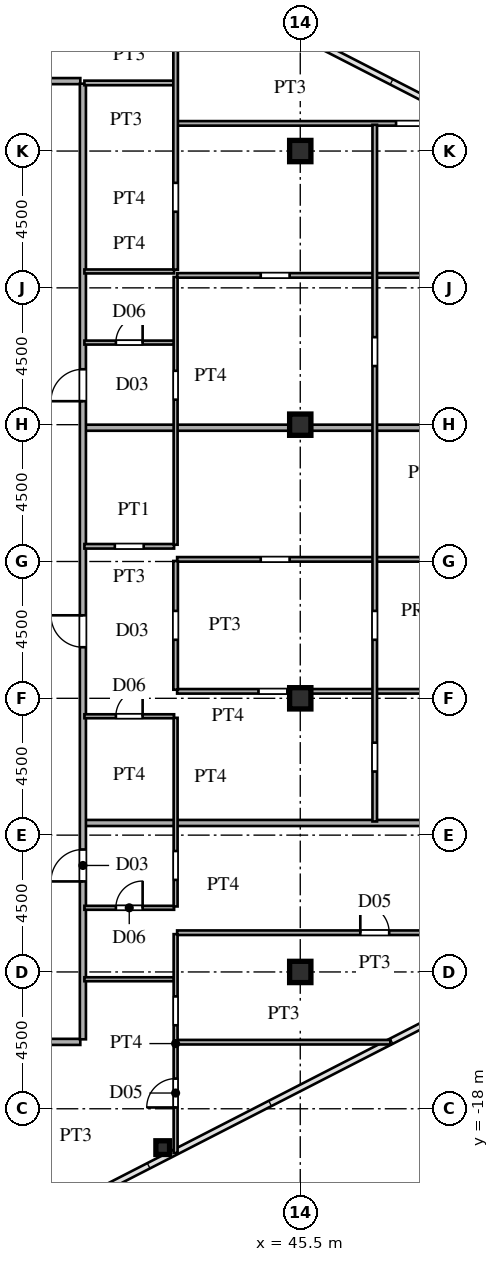
"""IFC4 building model, lengths in metres.
Left out: names, types, materials, properties, quantities, classifications, styles, units other than length and angle.
Written with IfcOpenShell. Run it as: python <this file> out.ifc"""

import sys

from ifc_helpers import new_model, si_unit, direction, frame, frame_2d, origin, origin_2d, place, context, subcontext, project, spatial, rectangle, hollow_rectangle, i_section, extrude, source, transform, mapped, element, fill, save


model = new_model("IFC4")
c1 = context("Model", 3, precision=1e-05, world=origin(), true_north=direction((0.0, 1.0)))
c2 = subcontext(c1, "Body", "Model", "MODEL_VIEW")
j1 = project(units=[si_unit("LENGTHUNIT", "METRE"), si_unit("PLANEANGLEUNIT", "RADIAN")], contexts=[c1])
p1 = place(None, origin())
s1 = spatial("IfcSite", under=j1, at=p1, CompositionType="ELEMENT")
p2 = place(p1, origin())
s2 = spatial("IfcBuilding", under=s1, at=p2, CompositionType="ELEMENT")
p3 = place(p2, frame((0.0, 0.0, 154.8)))
s3 = spatial("IfcBuildingStorey", under=s2, at=p3, CompositionType="ELEMENT", Elevation=154.8)
m1 = source(origin(), c2, "Body", "SweptSolid", [
    extrude(i_section(OverallWidth=0.7, OverallDepth=0.7, WebThickness=0.028, FlangeThickness=0.045, at=origin_2d()), origin(), (0.0, 0.0, 1.0), 3.6),
])
for number, where, z_axis, x_axis in (
    (1, (45.5, -13.5, 0.0), (0.0, 0.0, 1.0), (1.0, 0.0, 0.0)),
    (2, (45.5, -4.5, 0.0), (0.0, 0.0, 1.0), (1.0, 0.0, 0.0)),
    (3, (45.5, 4.5, 0.0), (0.0, 0.0, 1.0), (1.0, 0.0, 0.0)),
    (4, (45.5, 13.5, 0.0), (0.0, 0.0, 1.0), (1.0, 0.0, 0.0)),
):
    element("IfcColumn", number, at=place(p3, frame(where, z_axis=z_axis, x_axis=x_axis)), inside=s3, PredefinedType="COLUMN", context=c2, shape_type="MappedRepresentation", body=[
        mapped(m1, transform((0.0, 0.0, 0.0), scale=1.0)),
    ])
m2 = source(origin(), c2, "Body", "SweptSolid", [
    extrude(hollow_rectangle(XDim=0.45, YDim=0.45, WallThickness=0.018, at=origin_2d()), origin(), (0.0, 0.0, 1.0), 3.6),
])
p4 = place(p3, frame((40.976, -19.278, 0.0), z_axis=(0.0, 0.0, 1.0), x_axis=(1.0, 0.0, 0.0)))
e5 = element("IfcColumn", 5, at=p4, inside=s3, PredefinedType="COLUMN", context=c2, shape_type="MappedRepresentation", body=[
    mapped(m2, transform((0.0, 0.0, 0.0), scale=1.0)),
])
p5 = place(p3, frame((41.45, -15.81, 0.0), z_axis=(0.0, 0.0, 1.0), x_axis=(1.0, 0.0, 0.0)))
e6 = element("IfcWall", 6, at=p5, inside=s3, PredefinedType="PARTITIONING", context=c2, shape_type="SweptSolid", body=[
    extrude(rectangle(XDim=7.013, YDim=0.15, at=frame_2d((3.506, 0.0))), origin(), (0.0, 0.0, 1.0), 3.38),
])
p6 = place(p3, frame((27.5, -15.8, 0.0), z_axis=(0.0, 0.0, 1.0), x_axis=(1.0, 0.0, 0.0)))
e7 = element("IfcWall", 7, at=p6, inside=s3, PredefinedType="PARTITIONING", context=c2, shape_type="SweptSolid", body=[
    extrude(rectangle(XDim=10.765, YDim=0.2, at=frame_2d((5.382, 0.0))), origin(), (0.0, 0.0, 1.0), 3.38),
])
p7 = place(p3, frame((38.4, -13.74, 0.0), z_axis=(0.0, 0.0, 1.0), x_axis=(1.0, 0.0, 0.0)))
e8 = element("IfcWall", 8, at=p7, inside=s3, PredefinedType="PARTITIONING", context=c2, shape_type="SweptSolid", body=[
    extrude(rectangle(XDim=2.95, YDim=0.13, at=frame_2d((1.475, 0.0))), origin(), (0.0, 0.0, 1.0), 3.38),
])
p8 = place(p3, frame((41.45, -12.21, 0.0), z_axis=(0.0, 0.0, 1.0), x_axis=(1.0, 0.0, 0.0)))
e9 = element("IfcWall", 9, at=p8, inside=s3, PredefinedType="PARTITIONING", context=c2, shape_type="SweptSolid", body=[
    extrude(rectangle(XDim=13.0, YDim=0.15, at=frame_2d((6.5, 0.0))), origin(), (0.0, 0.0, 1.0), 3.38),
])
p9 = place(p8, frame((6.025, 0.0, 0.0)))
e10 = element("IfcOpeningElement", 10, at=p9, cuts=e9, PredefinedType="OPENING", context=c2, shape_type="SweptSolid", body=[
    extrude(rectangle(XDim=0.95, YDim=2.15, at=frame_2d((0.475, 1.075))), frame((0.0, 0.085, 0.0), z_axis=(0.0, -1.0, 0.0), x_axis=(1.0, 0.0, 0.0)), (0.0, 0.0, 1.0), 0.17),
])
p10 = place(p3, frame((38.4, -11.39, 0.0), z_axis=(0.0, 0.0, 1.0), x_axis=(1.0, 0.0, 0.0)))
e11 = element("IfcWall", 11, at=p10, inside=s3, PredefinedType="PARTITIONING", context=c2, shape_type="SweptSolid", body=[
    extrude(rectangle(XDim=2.95, YDim=0.13, at=frame_2d((1.475, 0.0))), origin(), (0.0, 0.0, 1.0), 3.38),
])
p11 = place(p10, frame((1.035, 0.0, 0.0)))
e12 = element("IfcOpeningElement", 12, at=p11, cuts=e11, PredefinedType="OPENING", context=c2, shape_type="SweptSolid", body=[
    extrude(rectangle(XDim=0.88, YDim=2.1, at=frame_2d((0.44, 1.05))), frame((0.0, 0.075, 0.0), z_axis=(0.0, -1.0, 0.0), x_axis=(1.0, 0.0, 0.0)), (0.0, 0.0, 1.0), 0.15),
])
p12 = place(p3, frame((38.43, -8.6, 0.0), z_axis=(0.0, 0.0, 1.0), x_axis=(1.0, 0.0, 0.0)))
e13 = element("IfcWall", 13, at=p12, inside=s3, PredefinedType="PARTITIONING", context=c2, shape_type="SweptSolid", body=[
    extrude(rectangle(XDim=24.066, YDim=0.2, at=frame_2d((12.033, 0.0))), origin(), (0.0, 0.0, 1.0), 3.38),
])
p13 = place(p3, frame((38.4, -5.09, 0.0), z_axis=(0.0, 0.0, 1.0), x_axis=(1.0, 0.0, 0.0)))
e14 = element("IfcWall", 14, at=p13, inside=s3, PredefinedType="PARTITIONING", context=c2, shape_type="SweptSolid", body=[
    extrude(rectangle(XDim=2.95, YDim=0.13, at=frame_2d((1.475, 0.0))), origin(), (0.0, 0.0, 1.0), 3.38),
])
p14 = place(p13, frame((1.035, 0.0, 0.0)))
e15 = element("IfcOpeningElement", 15, at=p14, cuts=e14, PredefinedType="OPENING", context=c2, shape_type="SweptSolid", body=[
    extrude(rectangle(XDim=0.88, YDim=2.1, at=frame_2d((0.44, 1.05))), frame((0.0, 0.075, 0.0), z_axis=(0.0, -1.0, 0.0), x_axis=(1.0, 0.0, 0.0)), (0.0, 0.0, 1.0), 0.15),
])
p15 = place(p3, frame((41.45, -4.27, 0.0), z_axis=(0.0, 0.0, 1.0), x_axis=(1.0, 0.0, 0.0)))
e16 = element("IfcWall", 16, at=p15, inside=s3, PredefinedType="PARTITIONING", context=c2, shape_type="SweptSolid", body=[
    extrude(rectangle(XDim=27.925, YDim=0.15, at=frame_2d((13.962, 0.0))), origin(), (0.0, 0.0, 1.0), 3.38),
])
p16 = place(p15, frame((2.676, 0.0, 0.0)))
e17 = element("IfcOpeningElement", 17, at=p16, cuts=e16, PredefinedType="OPENING", context=c2, shape_type="SweptSolid", body=[
    extrude(rectangle(XDim=0.95, YDim=2.15, at=frame_2d((0.475, 1.075))), frame((0.0, 0.085, 0.0), z_axis=(0.0, -1.0, 0.0), x_axis=(1.0, 0.0, 0.0)), (0.0, 0.0, 1.0), 0.17),
])
p17 = place(p15, frame((15.425, 0.0, 0.0)))
e18 = element("IfcOpeningElement", 18, at=p17, cuts=e16, PredefinedType="OPENING", context=c2, shape_type="SweptSolid", body=[
    extrude(rectangle(XDim=0.95, YDim=2.15, at=frame_2d((0.475, 1.075))), frame((0.0, 0.085, 0.0), z_axis=(0.0, -1.0, 0.0), x_axis=(1.0, 0.0, 0.0)), (0.0, 0.0, 1.0), 0.17),
])
p18 = place(p3, frame((41.45, 0.07, 0.0), z_axis=(0.0, 0.0, 1.0), x_axis=(1.0, 0.0, 0.0)))
e19 = element("IfcWall", 19, at=p18, inside=s3, PredefinedType="PARTITIONING", context=c2, shape_type="SweptSolid", body=[
    extrude(rectangle(XDim=28.085, YDim=0.15, at=frame_2d((14.042, 0.0))), origin(), (0.0, 0.0, 1.0), 3.38),
])
p19 = place(p18, frame((2.75, 0.0, 0.0)))
e20 = element("IfcOpeningElement", 20, at=p19, cuts=e19, PredefinedType="OPENING", context=c2, shape_type="SweptSolid", body=[
    extrude(rectangle(XDim=0.95, YDim=2.15, at=frame_2d((0.475, 1.075))), frame((0.0, 0.085, 0.0), z_axis=(0.0, -1.0, 0.0), x_axis=(1.0, 0.0, 0.0)), (0.0, 0.0, 1.0), 0.17),
])
p20 = place(p18, frame((15.425, 0.0, 0.0)))
e21 = element("IfcOpeningElement", 21, at=p20, cuts=e19, PredefinedType="OPENING", context=c2, shape_type="SweptSolid", body=[
    extrude(rectangle(XDim=0.95, YDim=2.15, at=frame_2d((0.475, 1.075))), frame((0.0, 0.085, 0.0), z_axis=(0.0, -1.0, 0.0), x_axis=(1.0, 0.0, 0.0)), (0.0, 0.0, 1.0), 0.17),
])
p21 = place(p3, frame((38.4, 0.5, 0.0), z_axis=(0.0, 0.0, 1.0), x_axis=(1.0, 0.0, 0.0)))
e22 = element("IfcWall", 22, at=p21, inside=s3, PredefinedType="PARTITIONING", context=c2, shape_type="SweptSolid", body=[
    extrude(rectangle(XDim=2.95, YDim=0.15, at=frame_2d((1.475, 0.0))), origin(), (0.0, 0.0, 1.0), 3.38),
])
p22 = place(p21, frame((1.0, 0.0, 0.0)))
e23 = element("IfcOpeningElement", 23, at=p22, cuts=e22, PredefinedType="OPENING", context=c2, shape_type="SweptSolid", body=[
    extrude(rectangle(XDim=0.95, YDim=2.15, at=frame_2d((0.475, 1.075))), frame((0.0, 0.085, 0.0), z_axis=(0.0, -1.0, 0.0), x_axis=(1.0, 0.0, 0.0)), (0.0, 0.0, 1.0), 0.17),
])
p23 = place(p3, frame((38.43, 4.4, 0.0), z_axis=(0.0, 0.0, 1.0), x_axis=(1.0, 0.0, 0.0)))
e24 = element("IfcWall", 24, at=p23, inside=s3, PredefinedType="PARTITIONING", context=c2, shape_type="SweptSolid", body=[
    extrude(rectangle(XDim=16.09, YDim=0.2, at=frame_2d((8.045, 0.0))), origin(), (0.0, 0.0, 1.0), 2.78),
])
p24 = place(p3, frame((38.4, 7.2, 0.0), z_axis=(0.0, 0.0, 1.0), x_axis=(1.0, 0.0, 0.0)))
e25 = element("IfcWall", 25, at=p24, inside=s3, PredefinedType="PARTITIONING", context=c2, shape_type="SweptSolid", body=[
    extrude(rectangle(XDim=2.95, YDim=0.13, at=frame_2d((1.475, 0.0))), origin(), (0.0, 0.0, 1.0), 3.38),
])
p25 = place(p24, frame((1.035, 0.0, 0.0)))
e26 = element("IfcOpeningElement", 26, at=p25, cuts=e25, PredefinedType="OPENING", context=c2, shape_type="SweptSolid", body=[
    extrude(rectangle(XDim=0.88, YDim=2.1, at=frame_2d((0.44, 1.05))), frame((0.0, 0.075, 0.0), z_axis=(0.0, -1.0, 0.0), x_axis=(1.0, 0.0, 0.0)), (0.0, 0.0, 1.0), 0.15),
])
p26 = place(p3, frame((41.45, 9.41, 0.0), z_axis=(0.0, 0.0, 1.0), x_axis=(1.0, 0.0, 0.0)))
e27 = element("IfcWall", 27, at=p26, inside=s3, PredefinedType="PARTITIONING", context=c2, shape_type="SweptSolid", body=[
    extrude(rectangle(XDim=18.7, YDim=0.15, at=frame_2d((9.35, 0.0))), origin(), (0.0, 0.0, 1.0), 3.38),
])
p27 = place(p26, frame((2.75, 0.0, 0.0)))
e28 = element("IfcOpeningElement", 28, at=p27, cuts=e27, PredefinedType="OPENING", context=c2, shape_type="SweptSolid", body=[
    extrude(rectangle(XDim=0.95, YDim=2.15, at=frame_2d((0.475, 1.075))), frame((0.0, 0.085, 0.0), z_axis=(0.0, -1.0, 0.0), x_axis=(1.0, 0.0, 0.0)), (0.0, 0.0, 1.0), 0.17),
])
p28 = place(p26, frame((15.425, 0.0, 0.0)))
e29 = element("IfcOpeningElement", 29, at=p28, cuts=e27, PredefinedType="OPENING", context=c2, shape_type="SweptSolid", body=[
    extrude(rectangle(XDim=0.95, YDim=2.15, at=frame_2d((0.475, 1.075))), frame((0.0, 0.085, 0.0), z_axis=(0.0, -1.0, 0.0), x_axis=(1.0, 0.0, 0.0)), (0.0, 0.0, 1.0), 0.17),
])
p29 = place(p26, frame((9.3, 0.0, 0.0)))
e30 = element("IfcOpeningElement", 30, at=p29, cuts=e27, PredefinedType="OPENING", context=c2, shape_type="SweptSolid", body=[
    extrude(rectangle(XDim=0.95, YDim=2.15, at=frame_2d((0.475, 1.075))), frame((0.0, 0.085, 0.0), z_axis=(0.0, -1.0, 0.0), x_axis=(1.0, 0.0, 0.0)), (0.0, 0.0, 1.0), 0.17),
])
p30 = place(p3, frame((38.4, 9.54, 0.0), z_axis=(0.0, 0.0, 1.0), x_axis=(1.0, 0.0, 0.0)))
e31 = element("IfcWall", 31, at=p30, inside=s3, PredefinedType="PARTITIONING", context=c2, shape_type="SweptSolid", body=[
    extrude(rectangle(XDim=2.95, YDim=0.13, at=frame_2d((1.475, 0.0))), origin(), (0.0, 0.0, 1.0), 3.38),
])
p31 = place(p3, frame((41.45, 14.41, 0.0), z_axis=(0.0, 0.0, 1.0), x_axis=(1.0, 0.0, 0.0)))
e32 = element("IfcWall", 32, at=p31, inside=s3, PredefinedType="PARTITIONING", context=c2, shape_type="SweptSolid", body=[
    extrude(rectangle(XDim=9.741, YDim=0.15, at=frame_2d((4.871, 0.0))), origin(), (0.0, 0.0, 1.0), 3.38),
])
p32 = place(p31, frame((7.201, 0.0, 0.0)))
e33 = element("IfcOpeningElement", 33, at=p32, cuts=e32, PredefinedType="OPENING", context=c2, shape_type="SweptSolid", body=[
    extrude(rectangle(XDim=0.95, YDim=2.15, at=frame_2d((0.475, 1.075))), frame((0.0, 0.085, 0.0), z_axis=(0.0, -1.0, 0.0), x_axis=(1.0, 0.0, 0.0)), (0.0, 0.0, 1.0), 0.17),
])
p33 = place(p3, frame((38.4, 15.74, 0.0), z_axis=(0.0, 0.0, 1.0), x_axis=(1.0, 0.0, 0.0)))
e34 = element("IfcWall", 34, at=p33, inside=s3, PredefinedType="PARTITIONING", context=c2, shape_type="SweptSolid", body=[
    extrude(rectangle(XDim=2.95, YDim=0.15, at=frame_2d((1.475, 0.0))), origin(), (0.0, 0.0, 1.0), 3.38),
])
p34 = place(p3, frame((27.5, 15.8, 0.0), z_axis=(0.0, 0.0, 1.0), x_axis=(1.0, 0.0, 0.0)))
e35 = element("IfcWall", 35, at=p34, inside=s3, PredefinedType="PARTITIONING", context=c2, shape_type="SweptSolid", body=[
    extrude(rectangle(XDim=10.765, YDim=0.2, at=frame_2d((5.382, 0.0))), origin(), (0.0, 0.0, 1.0), 3.38),
])
p35 = place(p3, frame((38.35, -15.715, 0.0), z_axis=(0.0, 0.0, 1.0), x_axis=(0.0, 1.0, 0.0)))
e36 = element("IfcWall", 36, at=p35, inside=s3, PredefinedType="PARTITIONING", context=c2, shape_type="SweptSolid", body=[
    extrude(rectangle(XDim=31.43, YDim=0.2, at=frame_2d((15.715, 0.0))), origin(), (0.0, 0.0, 1.0), 3.38),
])
p36 = place(p35, frame((5.192, 0.0, 0.0)))
e37 = element("IfcOpeningElement", 37, at=p36, cuts=e36, PredefinedType="OPENING", context=c2, shape_type="SweptSolid", body=[
    extrude(rectangle(XDim=1.05, YDim=2.25, at=frame_2d((0.525, 1.125))), frame((0.0, 0.11, 0.0), z_axis=(0.0, -1.0, 0.0), x_axis=(1.0, 0.0, 0.0)), (0.0, 0.0, 1.0), 0.22),
])
p37 = place(p35, frame((12.895, 0.0, 0.0)))
e38 = element("IfcOpeningElement", 38, at=p37, cuts=e36, PredefinedType="OPENING", context=c2, shape_type="SweptSolid", body=[
    extrude(rectangle(XDim=1.05, YDim=2.25, at=frame_2d((0.525, 1.125))), frame((0.0, 0.11, 0.0), z_axis=(0.0, -1.0, 0.0), x_axis=(1.0, 0.0, 0.0)), (0.0, 0.0, 1.0), 0.22),
])
p38 = place(p35, frame((20.988, 0.0, 0.0)))
e39 = element("IfcOpeningElement", 39, at=p38, cuts=e36, PredefinedType="OPENING", context=c2, shape_type="SweptSolid", body=[
    extrude(rectangle(XDim=1.05, YDim=2.25, at=frame_2d((0.525, 1.125))), frame((0.0, 0.11, 0.0), z_axis=(0.0, -1.0, 0.0), x_axis=(1.0, 0.0, 0.0)), (0.0, 0.0, 1.0), 0.22),
])
p39 = place(p3, frame((41.4, -19.455, 0.0), z_axis=(0.0, 0.0, 1.0), x_axis=(0.0, 1.0, 0.0)))
e40 = element("IfcWall", 40, at=p39, inside=s3, PredefinedType="PARTITIONING", context=c2, shape_type="SweptSolid", body=[
    extrude(rectangle(XDim=7.198, YDim=0.13, at=frame_2d((3.599, 0.0))), origin(), (0.0, 0.0, 1.0), 3.38),
])
p40 = place(p39, frame((4.201, 0.0, 0.0)))
e41 = element("IfcOpeningElement", 41, at=p40, cuts=e40, PredefinedType="OPENING", context=c2, shape_type="SweptSolid", body=[
    extrude(rectangle(XDim=0.95, YDim=2.15, at=frame_2d((0.475, 1.075))), frame((0.0, 0.075, 0.0), z_axis=(0.0, -1.0, 0.0), x_axis=(1.0, 0.0, 0.0)), (0.0, 0.0, 1.0), 0.15),
])
p41 = place(p39, frame((1.498, 0.0, 0.0)))
e42 = element("IfcOpeningElement", 42, at=p41, cuts=e40, PredefinedType="OPENING", context=c2, shape_type="SweptSolid", body=[
    extrude(rectangle(XDim=0.95, YDim=2.15, at=frame_2d((0.475, 1.075))), frame((0.0, 0.075, 0.0), z_axis=(0.0, -1.0, 0.0), x_axis=(1.0, 0.0, 0.0)), (0.0, 0.0, 1.0), 0.15),
])
p42 = place(p3, frame((41.4, -11.345, 0.0), z_axis=(0.0, 0.0, 1.0), x_axis=(0.0, 1.0, 0.0)))
e43 = element("IfcWall", 43, at=p42, inside=s3, PredefinedType="PARTITIONING", context=c2, shape_type="SweptSolid", body=[
    extrude(rectangle(XDim=6.203, YDim=0.13, at=frame_2d((3.102, 0.0))), origin(), (0.0, 0.0, 1.0), 3.38),
])
p43 = place(p42, frame((0.873, 0.0, 0.0)))
e44 = element("IfcOpeningElement", 44, at=p43, cuts=e43, PredefinedType="OPENING", context=c2, shape_type="SweptSolid", body=[
    extrude(rectangle(XDim=0.95, YDim=2.15, at=frame_2d((0.475, 1.075))), frame((0.0, 0.075, 0.0), z_axis=(0.0, -1.0, 0.0), x_axis=(1.0, 0.0, 0.0)), (0.0, 0.0, 1.0), 0.15),
])
p44 = place(p3, frame((41.4, -4.217, 0.0), z_axis=(0.0, 0.0, 1.0), x_axis=(0.0, 1.0, 0.0)))
e45 = element("IfcWall", 45, at=p44, inside=s3, PredefinedType="PARTITIONING", context=c2, shape_type="SweptSolid", body=[
    extrude(rectangle(XDim=4.234, YDim=0.15, at=frame_2d((2.117, 0.0))), origin(), (0.0, 0.0, 1.0), 3.38),
])
p45 = place(p44, frame((1.642, 0.0, 0.0)))
e46 = element("IfcOpeningElement", 46, at=p45, cuts=e45, PredefinedType="OPENING", context=c2, shape_type="SweptSolid", body=[
    extrude(rectangle(XDim=0.95, YDim=2.15, at=frame_2d((0.475, 1.075))), frame((0.0, 0.085, 0.0), z_axis=(0.0, -1.0, 0.0), x_axis=(1.0, 0.0, 0.0)), (0.0, 0.0, 1.0), 0.17),
])
p46 = place(p3, frame((41.4, 0.552, 0.0), z_axis=(0.0, 0.0, 1.0), x_axis=(0.0, 1.0, 0.0)))
e47 = element("IfcWall", 47, at=p46, inside=s3, PredefinedType="PARTITIONING", context=c2, shape_type="SweptSolid", body=[
    extrude(rectangle(XDim=8.805, YDim=0.13, at=frame_2d((4.402, 0.0))), origin(), (0.0, 0.0, 1.0), 3.38),
])
p47 = place(p46, frame((4.771, 0.0, 0.0)))
e48 = element("IfcOpeningElement", 48, at=p47, cuts=e47, PredefinedType="OPENING", context=c2, shape_type="SweptSolid", body=[
    extrude(rectangle(XDim=0.95, YDim=2.15, at=frame_2d((0.475, 1.075))), frame((0.0, 0.075, 0.0), z_axis=(0.0, -1.0, 0.0), x_axis=(1.0, 0.0, 0.0)), (0.0, 0.0, 1.0), 0.15),
])
p48 = place(p3, frame((41.4, 9.595, 0.0), z_axis=(0.0, 0.0, 1.0), x_axis=(0.0, 1.0, 0.0)))
e49 = element("IfcWall", 49, at=p48, inside=s3, PredefinedType="PARTITIONING", context=c2, shape_type="SweptSolid", body=[
    extrude(rectangle(XDim=9.86, YDim=0.15, at=frame_2d((4.93, 0.0))), origin(), (0.0, 0.0, 1.0), 3.38),
])
p49 = place(p48, frame((1.909, 0.0, 0.0)))
e50 = element("IfcOpeningElement", 50, at=p49, cuts=e49, PredefinedType="OPENING", context=c2, shape_type="SweptSolid", body=[
    extrude(rectangle(XDim=0.95, YDim=2.15, at=frame_2d((0.475, 1.075))), frame((0.0, 0.085, 0.0), z_axis=(0.0, -1.0, 0.0), x_axis=(1.0, 0.0, 0.0)), (0.0, 0.0, 1.0), 0.17),
])
p50 = place(p48, frame((7.447, 0.0, 0.0)))
e51 = element("IfcOpeningElement", 51, at=p50, cuts=e49, PredefinedType="OPENING", context=c2, shape_type="SweptSolid", body=[
    extrude(rectangle(XDim=0.95, YDim=2.15, at=frame_2d((0.475, 1.075))), frame((0.0, 0.085, 0.0), z_axis=(0.0, -1.0, 0.0), x_axis=(1.0, 0.0, 0.0)), (0.0, 0.0, 1.0), 0.17),
])
p51 = place(p3, frame((47.95, -8.55, 0.0), z_axis=(0.0, 0.0, 1.0), x_axis=(0.0, 1.0, 0.0)))
e52 = element("IfcWall", 52, at=p51, inside=s3, PredefinedType="PARTITIONING", context=c2, shape_type="SweptSolid", body=[
    extrude(rectangle(XDim=22.913, YDim=0.15, at=frame_2d((11.457, 0.0))), origin(), (0.0, 0.0, 1.0), 3.38),
])
p52 = place(p51, frame((5.975, 0.0, 0.0)))
e53 = element("IfcOpeningElement", 53, at=p52, cuts=e52, PredefinedType="OPENING", context=c2, shape_type="SweptSolid", body=[
    extrude(rectangle(XDim=0.95, YDim=2.15, at=frame_2d((0.475, 1.075))), frame((0.0, 0.085, 0.0), z_axis=(0.0, -1.0, 0.0), x_axis=(1.0, 0.0, 0.0)), (0.0, 0.0, 1.0), 0.17),
])
p53 = place(p51, frame((1.642, 0.0, 0.0)))
e54 = element("IfcOpeningElement", 54, at=p53, cuts=e52, PredefinedType="OPENING", context=c2, shape_type="SweptSolid", body=[
    extrude(rectangle(XDim=0.95, YDim=2.15, at=frame_2d((0.475, 1.075))), frame((0.0, 0.085, 0.0), z_axis=(0.0, -1.0, 0.0), x_axis=(1.0, 0.0, 0.0)), (0.0, 0.0, 1.0), 0.17),
])
p54 = place(p51, frame((14.978, 0.0, 0.0)))
e55 = element("IfcOpeningElement", 55, at=p54, cuts=e52, PredefinedType="OPENING", context=c2, shape_type="SweptSolid", body=[
    extrude(rectangle(XDim=0.95, YDim=2.15, at=frame_2d((0.475, 1.075))), frame((0.0, 0.085, 0.0), z_axis=(0.0, -1.0, 0.0), x_axis=(1.0, 0.0, 0.0)), (0.0, 0.0, 1.0), 0.17),
])
m3 = source(origin(), c2, "Body", "SweptSolid", [
    extrude(rectangle(XDim=0.95, YDim=2.15, at=frame_2d((0.475, 1.075))), frame((0.0, 0.025, 0.0), z_axis=(0.0, -1.0, 0.0), x_axis=(1.0, 0.0, 0.0)), (0.0, 0.0, 1.0), 0.05),
])
p55 = place(p9, origin())
e56 = element("IfcDoor", 56, at=p55, inside=s3, OperationType="SINGLE_SWING_LEFT", PredefinedType="DOOR", context=c2, shape_type="MappedRepresentation", body=[
    mapped(m3, transform((0.0, 0.0, 0.0), scale=1.0)),
])
fill(e10, e56)
m4 = source(origin(), c2, "Body", "SweptSolid", [
    extrude(rectangle(XDim=0.88, YDim=2.1, at=frame_2d((0.44, 1.05))), frame((0.0, 0.025, 0.0), z_axis=(0.0, -1.0, 0.0), x_axis=(1.0, 0.0, 0.0)), (0.0, 0.0, 1.0), 0.05),
])
p56 = place(p11, origin())
e57 = element("IfcDoor", 57, at=p56, inside=s3, OperationType="SINGLE_SWING_RIGHT", PredefinedType="DOOR", context=c2, shape_type="MappedRepresentation", body=[
    mapped(m4, transform((0.0, 0.0, 0.0), scale=1.0)),
])
fill(e12, e57)
p57 = place(p14, origin())
e58 = element("IfcDoor", 58, at=p57, inside=s3, OperationType="SINGLE_SWING_RIGHT", PredefinedType="DOOR", context=c2, shape_type="MappedRepresentation", body=[
    mapped(m4, transform((0.0, 0.0, 0.0), scale=1.0)),
])
fill(e15, e58)
p58 = place(p25, origin())
e59 = element("IfcDoor", 59, at=p58, inside=s3, OperationType="SINGLE_SWING_RIGHT", PredefinedType="DOOR", context=c2, shape_type="MappedRepresentation", body=[
    mapped(m4, transform((0.0, 0.0, 0.0), scale=1.0)),
])
fill(e26, e59)
m5 = source(origin(), c2, "Body", "SweptSolid", [
    extrude(rectangle(XDim=1.05, YDim=2.25, at=frame_2d((0.525, 1.125))), frame((0.0, 0.025, 0.0), z_axis=(0.0, -1.0, 0.0), x_axis=(1.0, 0.0, 0.0)), (0.0, 0.0, 1.0), 0.05),
])
p59 = place(p36, origin())
e60 = element("IfcDoor", 60, at=p59, inside=s3, OperationType="SINGLE_SWING_LEFT", PredefinedType="DOOR", context=c2, shape_type="MappedRepresentation", body=[
    mapped(m5, transform((0.0, 0.0, 0.0), scale=1.0)),
])
fill(e37, e60)
p60 = place(p37, origin())
e61 = element("IfcDoor", 61, at=p60, inside=s3, OperationType="SINGLE_SWING_RIGHT", PredefinedType="DOOR", context=c2, shape_type="MappedRepresentation", body=[
    mapped(m5, transform((0.0, 0.0, 0.0), scale=1.0)),
])
fill(e38, e61)
p61 = place(p38, origin())
e62 = element("IfcDoor", 62, at=p61, inside=s3, OperationType="SINGLE_SWING_LEFT", PredefinedType="DOOR", context=c2, shape_type="MappedRepresentation", body=[
    mapped(m5, transform((0.0, 0.0, 0.0), scale=1.0)),
])
fill(e39, e62)
p62 = place(p41, origin())
e63 = element("IfcDoor", 63, at=p62, inside=s3, OperationType="SINGLE_SWING_LEFT", PredefinedType="DOOR", context=c2, shape_type="MappedRepresentation", body=[
    mapped(m3, transform((0.0, 0.0, 0.0), scale=1.0)),
])
fill(e42, e63)
save(model, sys.argv[1])
